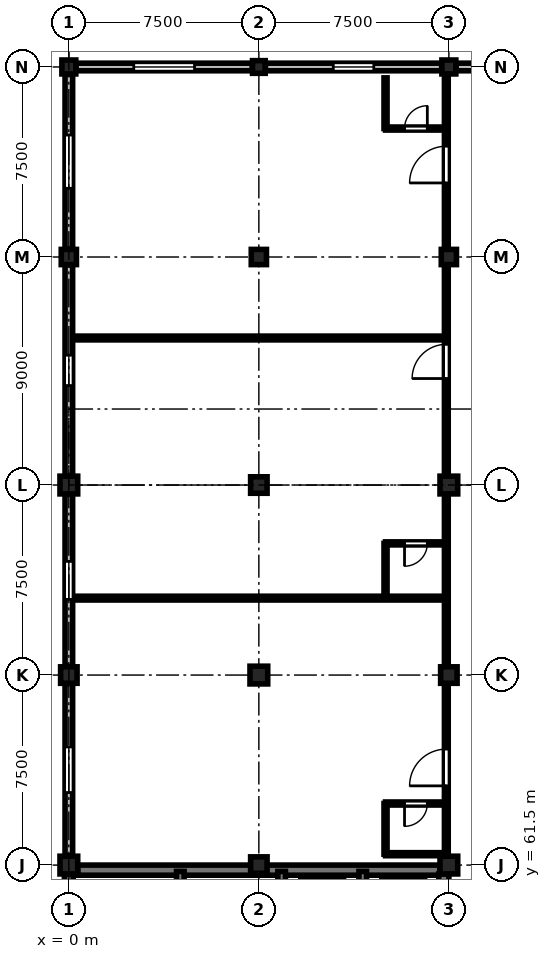
"""IFC4 building model, lengths in metres.
Left out: names, types, materials, properties, quantities, classifications, styles, units other than length and angle.
Written with IfcOpenShell. Run it as: python <this file> out.ifc"""

import sys

from ifc_helpers import new_model, si_unit, direction, frame, frame_2d, origin, origin_2d, place, context, subcontext, project, spatial, rectangle, circle, extrude, element, fill, save


model = new_model("IFC4")
c1 = context("Model", 3, precision=1e-05, world=origin(), true_north=direction((0.0, 1.0)))
c2 = subcontext(c1, "Body", "Model", "MODEL_VIEW")
j1 = project(units=[si_unit("LENGTHUNIT", "METRE"), si_unit("PLANEANGLEUNIT", "RADIAN")], contexts=[c1])
p1 = place(None, origin())
s1 = spatial("IfcSite", under=j1, at=p1, CompositionType="ELEMENT")
p2 = place(p1, origin())
s2 = spatial("IfcBuilding", under=s1, at=p2, CompositionType="ELEMENT")
p3 = place(p2, frame((0.0, 0.0, 17.85)))
s3 = spatial("IfcBuildingStorey", under=s2, at=p3, CompositionType="ELEMENT", Elevation=17.85)
p4 = place(p3, frame((0.0, 61.5, 0.0), z_axis=(0.0, 0.0, 1.0), x_axis=(1.0, 0.0, 0.0)))
e1 = element("IfcColumn", 1, at=p4, inside=s3, PredefinedType="COLUMN", context=c2, shape_type="SweptSolid", body=[
    extrude(rectangle(XDim=0.7, YDim=0.7, at=origin_2d()), origin(), (0.0, 0.0, 1.0), 4.05),
])
p5 = place(p3, frame((0.0, 69.0, 0.0), z_axis=(0.0, 0.0, 1.0), x_axis=(1.0, 0.0, 0.0)))
e2 = element("IfcColumn", 2, at=p5, inside=s3, PredefinedType="COLUMN", context=c2, shape_type="SweptSolid", body=[
    extrude(rectangle(XDim=0.65, YDim=0.65, at=origin_2d()), origin(), (0.0, 0.0, 1.0), 4.05),
])
p6 = place(p3, frame((0.0, 76.5, 0.0), z_axis=(0.0, 0.0, 1.0), x_axis=(1.0, 0.0, 0.0)))
e3 = element("IfcColumn", 3, at=p6, inside=s3, PredefinedType="COLUMN", context=c2, shape_type="SweptSolid", body=[
    extrude(rectangle(XDim=0.7, YDim=0.7, at=origin_2d()), origin(), (0.0, 0.0, 1.0), 4.05),
])
p7 = place(p3, frame((0.0, 85.5, 0.0), z_axis=(0.0, 0.0, 1.0), x_axis=(1.0, 0.0, 0.0)))
e4 = element("IfcColumn", 4, at=p7, inside=s3, PredefinedType="COLUMN", context=c2, shape_type="SweptSolid", body=[
    extrude(rectangle(XDim=0.6, YDim=0.6, at=origin_2d()), origin(), (0.0, 0.0, 1.0), 4.05),
])
p8 = place(p3, frame((0.0, 93.0, 0.0), z_axis=(0.0, 0.0, 1.0), x_axis=(1.0, 0.0, 0.0)))
e5 = element("IfcColumn", 5, at=p8, inside=s3, PredefinedType="COLUMN", context=c2, shape_type="SweptSolid", body=[
    extrude(rectangle(XDim=0.55, YDim=0.55, at=origin_2d()), origin(), (0.0, 0.0, 1.0), 4.05),
])
p9 = place(p3, frame((7.5, 61.5, 0.0), z_axis=(0.0, 0.0, 1.0), x_axis=(1.0, 0.0, 0.0)))
e6 = element("IfcColumn", 6, at=p9, inside=s3, PredefinedType="COLUMN", context=c2, shape_type="SweptSolid", body=[
    extrude(rectangle(XDim=0.65, YDim=0.65, at=origin_2d()), origin(), (0.0, 0.0, 1.0), 4.05),
])
p10 = place(p3, frame((7.5, 69.0, 0.0), z_axis=(0.0, 0.0, 1.0), x_axis=(1.0, 0.0, 0.0)))
e7 = element("IfcColumn", 7, at=p10, inside=s3, PredefinedType="COLUMN", context=c2, shape_type="SweptSolid", body=[
    extrude(rectangle(XDim=0.7, YDim=0.7, at=origin_2d()), origin(), (0.0, 0.0, 1.0), 4.05),
])
p11 = place(p3, frame((7.5, 76.5, 0.0), z_axis=(0.0, 0.0, 1.0), x_axis=(1.0, 0.0, 0.0)))
e8 = element("IfcColumn", 8, at=p11, inside=s3, PredefinedType="COLUMN", context=c2, shape_type="SweptSolid", body=[
    extrude(rectangle(XDim=0.65, YDim=0.65, at=origin_2d()), origin(), (0.0, 0.0, 1.0), 4.05),
])
p12 = place(p3, frame((7.5, 85.5, 0.0), z_axis=(0.0, 0.0, 1.0), x_axis=(1.0, 0.0, 0.0)))
e9 = element("IfcColumn", 9, at=p12, inside=s3, PredefinedType="COLUMN", context=c2, shape_type="SweptSolid", body=[
    extrude(circle(Radius=0.3, at=origin_2d()), origin(), (0.0, 0.0, 1.0), 4.05),
])
p13 = place(p3, frame((7.5, 93.0, 0.0), z_axis=(0.0, 0.0, 1.0), x_axis=(1.0, 0.0, 0.0)))
e10 = element("IfcColumn", 10, at=p13, inside=s3, PredefinedType="COLUMN", context=c2, shape_type="SweptSolid", body=[
    extrude(rectangle(XDim=0.5, YDim=0.5, at=origin_2d()), origin(), (0.0, 0.0, 1.0), 4.05),
])
p14 = place(p3, frame((15.0, 61.5, 0.0), z_axis=(0.0, 0.0, 1.0), x_axis=(1.0, 0.0, 0.0)))
e11 = element("IfcColumn", 11, at=p14, inside=s3, PredefinedType="COLUMN", context=c2, shape_type="SweptSolid", body=[
    extrude(rectangle(XDim=0.7, YDim=0.7, at=origin_2d()), origin(), (0.0, 0.0, 1.0), 4.05),
])
p15 = place(p3, frame((15.0, 69.0, 0.0), z_axis=(0.0, 0.0, 1.0), x_axis=(1.0, 0.0, 0.0)))
e12 = element("IfcColumn", 12, at=p15, inside=s3, PredefinedType="COLUMN", context=c2, shape_type="SweptSolid", body=[
    extrude(rectangle(XDim=0.65, YDim=0.65, at=origin_2d()), origin(), (0.0, 0.0, 1.0), 4.05),
])
p16 = place(p3, frame((15.0, 76.5, 0.0), z_axis=(0.0, 0.0, 1.0), x_axis=(1.0, 0.0, 0.0)))
e13 = element("IfcColumn", 13, at=p16, inside=s3, PredefinedType="COLUMN", context=c2, shape_type="SweptSolid", body=[
    extrude(rectangle(XDim=0.7, YDim=0.7, at=origin_2d()), origin(), (0.0, 0.0, 1.0), 4.05),
])
p17 = place(p3, frame((15.0, 85.5, 0.0), z_axis=(0.0, 0.0, 1.0), x_axis=(1.0, 0.0, 0.0)))
e14 = element("IfcColumn", 14, at=p17, inside=s3, PredefinedType="COLUMN", context=c2, shape_type="SweptSolid", body=[
    extrude(rectangle(XDim=0.6, YDim=0.6, at=origin_2d()), origin(), (0.0, 0.0, 1.0), 4.05),
])
p18 = place(p3, frame((15.0, 93.0, 0.0), z_axis=(0.0, 0.0, 1.0), x_axis=(1.0, 0.0, 0.0)))
e15 = element("IfcColumn", 15, at=p18, inside=s3, PredefinedType="COLUMN", context=c2, shape_type="SweptSolid", body=[
    extrude(rectangle(XDim=0.55, YDim=0.55, at=origin_2d()), origin(), (0.0, 0.0, 1.0), 4.05),
])
p19 = place(p3, frame((0.0, 54.335, 0.0), z_axis=(0.0, 0.0, 1.0), x_axis=(0.0, 1.0, 0.0)))
e16 = element("IfcWall", 16, at=p19, inside=s3, PredefinedType="SHEAR", context=c2, shape_type="SweptSolid", body=[
    extrude(rectangle(XDim=6.805, YDim=0.35, at=frame_2d((3.402, 0.0))), origin(), (0.0, 0.0, 1.0), 3.77),
])
p20 = place(p3, frame((0.0, 61.86, 0.0), z_axis=(0.0, 0.0, 1.0), x_axis=(0.0, 1.0, 0.0)))
e17 = element("IfcWall", 17, at=p20, inside=s3, PredefinedType="STANDARD", context=c2, shape_type="SweptSolid", body=[
    extrude(rectangle(XDim=6.805, YDim=0.3, at=frame_2d((3.402, 0.0))), origin(), (0.0, 0.0, 1.0), 3.17),
])
p21 = place(p20, frame((2.502, 0.0, 0.9)))
e18 = element("IfcOpeningElement", 18, at=p21, cuts=e17, PredefinedType="OPENING", context=c2, shape_type="SweptSolid", body=[
    extrude(rectangle(XDim=1.8, YDim=1.99, at=frame_2d((0.9, 0.995))), frame((0.0, 0.16, 0.0), z_axis=(0.0, -1.0, 0.0), x_axis=(1.0, 0.0, 0.0)), (0.0, 0.0, 1.0), 0.32),
])
p22 = place(p3, frame((0.0, 69.335, 0.0), z_axis=(0.0, 0.0, 1.0), x_axis=(0.0, 1.0, 0.0)))
e19 = element("IfcWall", 19, at=p22, inside=s3, PredefinedType="STANDARD", context=c2, shape_type="SweptSolid", body=[
    extrude(rectangle(XDim=6.805, YDim=0.3, at=frame_2d((3.402, 0.0))), origin(), (0.0, 0.0, 1.0), 3.17),
])
p23 = place(p22, frame((2.653, 0.0, 0.9)))
e20 = element("IfcOpeningElement", 20, at=p23, cuts=e19, PredefinedType="OPENING", context=c2, shape_type="SweptSolid", body=[
    extrude(rectangle(XDim=1.5, YDim=1.99, at=frame_2d((0.75, 0.995))), frame((0.0, 0.16, 0.0), z_axis=(0.0, -1.0, 0.0), x_axis=(1.0, 0.0, 0.0)), (0.0, 0.0, 1.0), 0.32),
])
p24 = place(p3, frame((0.0, 76.86, 0.0), z_axis=(0.0, 0.0, 1.0), x_axis=(0.0, 1.0, 0.0)))
e21 = element("IfcWall", 21, at=p24, inside=s3, PredefinedType="STANDARD", context=c2, shape_type="SweptSolid", body=[
    extrude(rectangle(XDim=8.33, YDim=0.3, at=frame_2d((4.165, 0.0))), origin(), (0.0, 0.0, 1.0), 3.22),
])
p25 = place(p24, frame((3.565, 0.0, 0.9)))
e22 = element("IfcOpeningElement", 22, at=p25, cuts=e21, PredefinedType="OPENING", context=c2, shape_type="SweptSolid", body=[
    extrude(rectangle(XDim=1.2, YDim=2.04, at=frame_2d((0.6, 1.02))), frame((0.0, 0.16, 0.0), z_axis=(0.0, -1.0, 0.0), x_axis=(1.0, 0.0, 0.0)), (0.0, 0.0, 1.0), 0.32),
])
p26 = place(p3, frame((0.285, 93.0, 0.0), z_axis=(0.0, 0.0, 1.0), x_axis=(1.0, 0.0, 0.0)))
e23 = element("IfcWall", 23, at=p26, inside=s3, PredefinedType="STANDARD", context=c2, shape_type="SweptSolid", body=[
    extrude(rectangle(XDim=6.955, YDim=0.3, at=frame_2d((3.478, 0.0))), origin(), (0.0, 0.0, 1.0), 3.17),
])
p27 = place(p26, frame((2.278, 0.0, 0.9)))
e24 = element("IfcOpeningElement", 24, at=p27, cuts=e23, PredefinedType="OPENING", context=c2, shape_type="SweptSolid", body=[
    extrude(rectangle(XDim=2.4, YDim=1.99, at=frame_2d((1.2, 0.995))), frame((0.0, 0.16, 0.0), z_axis=(0.0, -1.0, 0.0), x_axis=(1.0, 0.0, 0.0)), (0.0, 0.0, 1.0), 0.32),
])
p28 = place(p3, frame((0.0, 85.81, 0.0), z_axis=(0.0, 0.0, 1.0), x_axis=(0.0, 1.0, 0.0)))
e25 = element("IfcWall", 25, at=p28, inside=s3, PredefinedType="STANDARD", context=c2, shape_type="SweptSolid", body=[
    extrude(rectangle(XDim=6.905, YDim=0.3, at=frame_2d((3.453, 0.0))), origin(), (0.0, 0.0, 1.0), 3.17),
])
p29 = place(p28, frame((2.403, 0.0, 0.9)))
e26 = element("IfcOpeningElement", 26, at=p29, cuts=e25, PredefinedType="OPENING", context=c2, shape_type="SweptSolid", body=[
    extrude(rectangle(XDim=2.1, YDim=1.99, at=frame_2d((1.05, 0.995))), frame((0.0, 0.16, 0.0), z_axis=(0.0, -1.0, 0.0), x_axis=(1.0, 0.0, 0.0)), (0.0, 0.0, 1.0), 0.32),
])
p30 = place(p3, frame((7.76, 93.0, 0.0), z_axis=(0.0, 0.0, 1.0), x_axis=(1.0, 0.0, 0.0)))
e27 = element("IfcWall", 27, at=p30, inside=s3, PredefinedType="STANDARD", context=c2, shape_type="SweptSolid", body=[
    extrude(rectangle(XDim=6.955, YDim=0.3, at=frame_2d((3.478, 0.0))), origin(), (0.0, 0.0, 1.0), 3.17),
])
p31 = place(p30, frame((2.677, 0.0, 0.9)))
e28 = element("IfcOpeningElement", 28, at=p31, cuts=e27, PredefinedType="OPENING", context=c2, shape_type="SweptSolid", body=[
    extrude(rectangle(XDim=1.6, YDim=1.95, at=frame_2d((0.8, 0.975))), frame((0.0, 0.16, 0.0), z_axis=(0.0, -1.0, 0.0), x_axis=(1.0, 0.0, 0.0)), (0.0, 0.0, 1.0), 0.32),
])
p32 = place(p3, frame((15.285, 93.0, 0.0), z_axis=(0.0, 0.0, 1.0), x_axis=(1.0, 0.0, 0.0)))
e29 = element("IfcWall", 29, at=p32, inside=s3, PredefinedType="STANDARD", context=c2, shape_type="SweptSolid", body=[
    extrude(rectangle(XDim=6.955, YDim=0.3, at=frame_2d((3.478, 0.0))), origin(), (0.0, 0.0, 1.0), 3.17),
])
p33 = place(p32, frame((2.577, 0.0, 0.9)))
e30 = element("IfcOpeningElement", 30, at=p33, cuts=e29, PredefinedType="OPENING", context=c2, shape_type="SweptSolid", body=[
    extrude(rectangle(XDim=1.8, YDim=1.95, at=frame_2d((0.9, 0.975))), frame((0.0, 0.16, 0.0), z_axis=(0.0, -1.0, 0.0), x_axis=(1.0, 0.0, 0.0)), (0.0, 0.0, 1.0), 0.32),
])
p34 = place(p3, frame((0.35, 61.3, 0.0), z_axis=(0.0, 0.0, 1.0), x_axis=(1.0, 0.0, 0.0)))
e31 = element("IfcWall", 31, at=p34, inside=s3, PredefinedType="SHEAR", context=c2, shape_type="SweptSolid", body=[
    extrude(rectangle(XDim=14.3, YDim=0.4, at=frame_2d((7.15, 0.0))), origin(), (0.0, 0.0, 1.0), 3.77),
])
p35 = place(p3, frame((14.8, 58.1, 0.0), z_axis=(0.0, 0.0, 1.0), x_axis=(0.0, 1.0, 0.0)))
e32 = element("IfcWall", 32, at=p35, inside=s3, PredefinedType="SHEAR", context=c2, shape_type="SweptSolid", body=[
    extrude(rectangle(XDim=3.05, YDim=0.4, at=frame_2d((1.525, 0.0))), origin(), (0.0, 0.0, 1.0), 3.77),
])
for number, where, z_axis, x_axis in (
    (33, (4.4, 58.1, 0.0), (0.0, 0.0, 1.0), (0.0, 1.0, 0.0)),
    (34, (8.4, 58.1, 0.0), (0.0, 0.0, 1.0), (0.0, 1.0, 0.0)),
    (35, (11.6, 58.1, 0.0), (0.0, 0.0, 1.0), (0.0, 1.0, 0.0)),
):
    element("IfcWall", number, at=place(p3, frame(where, z_axis=z_axis, x_axis=x_axis)), inside=s3, PredefinedType="SHEAR", context=c2, shape_type="SweptSolid", body=[
        extrude(rectangle(XDim=3.15, YDim=0.3, at=frame_2d((1.575, 0.0))), origin(), (0.0, 0.0, 1.0), 3.77),
    ])
p36 = place(p3, frame((14.9, 61.93, 0.0), z_axis=(0.0, 0.0, 1.0), x_axis=(0.0, 1.0, 0.0)))
e36 = element("IfcWall", 36, at=p36, inside=s3, PredefinedType="PARTITIONING", context=c2, shape_type="SweptSolid", body=[
    extrude(rectangle(XDim=10.107, YDim=0.15, at=frame_2d((5.053, 0.0))), origin(), (0.0, 0.0, 1.0), 3.205),
])
p37 = place(p36, frame((2.697, 0.0, 0.0)))
e37 = element("IfcOpeningElement", 37, at=p37, cuts=e36, PredefinedType="OPENING", context=c2, shape_type="SweptSolid", body=[
    extrude(rectangle(XDim=1.45, YDim=2.3, at=frame_2d((0.725, 1.15))), frame((0.0, 0.085, 0.0), z_axis=(0.0, -1.0, 0.0), x_axis=(1.0, 0.0, 0.0)), (0.0, 0.0, 1.0), 0.17),
])
p38 = place(p3, frame((14.9, 63.93, 0.0), z_axis=(0.0, 0.0, 1.0), x_axis=(-1.0, 0.0, 0.0)))
e38 = element("IfcWall", 38, at=p38, inside=s3, PredefinedType="PARTITIONING", context=c2, shape_type="SweptSolid", body=[
    extrude(rectangle(XDim=2.4, YDim=0.12, at=frame_2d((1.2, 0.0))), origin(), (0.0, 0.0, 1.0), 3.755),
])
p39 = place(p38, frame((0.75, 0.0, 0.0)))
e39 = element("IfcOpeningElement", 39, at=p39, cuts=e38, PredefinedType="OPENING", context=c2, shape_type="SweptSolid", body=[
    extrude(rectangle(XDim=0.9, YDim=2.1, at=frame_2d((0.45, 1.05))), frame((0.0, 0.07, 0.0), z_axis=(0.0, -1.0, 0.0), x_axis=(1.0, 0.0, 0.0)), (0.0, 0.0, 1.0), 0.14),
])
p40 = place(p3, frame((12.5, 61.93, 0.0), z_axis=(0.0, 0.0, 1.0), x_axis=(0.0, 1.0, 0.0)))
e40 = element("IfcWall", 40, at=p40, inside=s3, PredefinedType="PARTITIONING", context=c2, shape_type="SweptSolid", body=[
    extrude(rectangle(XDim=2.0, YDim=0.12, at=frame_2d((1.0, 0.0))), origin(), (0.0, 0.0, 1.0), 3.755),
])
p41 = place(p3, frame((14.9, 72.197, 0.0), z_axis=(0.0, 0.0, 1.0), x_axis=(0.0, 1.0, 0.0)))
e41 = element("IfcWall", 41, at=p41, inside=s3, PredefinedType="PARTITIONING", context=c2, shape_type="SweptSolid", body=[
    extrude(rectangle(XDim=10.106, YDim=0.15, at=frame_2d((5.053, 0.0))), origin(), (0.0, 0.0, 1.0), 3.055),
])
p42 = place(p41, frame((8.507, 0.0, 0.0)))
e42 = element("IfcOpeningElement", 42, at=p42, cuts=e41, PredefinedType="OPENING", context=c2, shape_type="SweptSolid", body=[
    extrude(rectangle(XDim=1.35, YDim=2.25, at=frame_2d((0.675, 1.125))), frame((0.0, 0.085, 0.0), z_axis=(0.0, -1.0, 0.0), x_axis=(1.0, 0.0, 0.0)), (0.0, 0.0, 1.0), 0.17),
])
p43 = place(p3, frame((14.9, 74.197, 0.0), z_axis=(0.0, 0.0, 1.0), x_axis=(-1.0, 0.0, 0.0)))
e43 = element("IfcWall", 43, at=p43, inside=s3, PredefinedType="PARTITIONING", context=c2, shape_type="SweptSolid", body=[
    extrude(rectangle(XDim=2.4, YDim=0.12, at=frame_2d((1.2, 0.0))), origin(), (0.0, 0.0, 1.0), 3.755),
])
p44 = place(p43, frame((0.75, 0.0, 0.0)))
e44 = element("IfcOpeningElement", 44, at=p44, cuts=e43, PredefinedType="OPENING", context=c2, shape_type="SweptSolid", body=[
    extrude(rectangle(XDim=0.9, YDim=2.1, at=frame_2d((0.45, 1.05))), frame((0.0, 0.07, 0.0), z_axis=(0.0, -1.0, 0.0), x_axis=(1.0, 0.0, 0.0)), (0.0, 0.0, 1.0), 0.14),
])
p45 = place(p3, frame((12.5, 72.197, 0.0), z_axis=(0.0, 0.0, 1.0), x_axis=(0.0, 1.0, 0.0)))
e45 = element("IfcWall", 45, at=p45, inside=s3, PredefinedType="PARTITIONING", context=c2, shape_type="SweptSolid", body=[
    extrude(rectangle(XDim=2.0, YDim=0.12, at=frame_2d((1.0, 0.0))), origin(), (0.0, 0.0, 1.0), 3.755),
])
p46 = place(p3, frame((14.9, 82.463, 0.0), z_axis=(0.0, 0.0, 1.0), x_axis=(0.0, 1.0, 0.0)))
e46 = element("IfcWall", 46, at=p46, inside=s3, PredefinedType="PARTITIONING", context=c2, shape_type="SweptSolid", body=[
    extrude(rectangle(XDim=10.107, YDim=0.15, at=frame_2d((5.053, 0.0))), origin(), (0.0, 0.0, 1.0), 3.055),
])
p47 = place(p46, frame((5.96, 0.0, 0.0)))
e47 = element("IfcOpeningElement", 47, at=p47, cuts=e46, PredefinedType="OPENING", context=c2, shape_type="SweptSolid", body=[
    extrude(rectangle(XDim=1.45, YDim=2.3, at=frame_2d((0.725, 1.15))), frame((0.0, 0.085, 0.0), z_axis=(0.0, -1.0, 0.0), x_axis=(1.0, 0.0, 0.0)), (0.0, 0.0, 1.0), 0.17),
])
p48 = place(p3, frame((12.5, 90.57, 0.0), z_axis=(0.0, 0.0, 1.0), x_axis=(1.0, 0.0, 0.0)))
e48 = element("IfcWall", 48, at=p48, inside=s3, PredefinedType="PARTITIONING", context=c2, shape_type="SweptSolid", body=[
    extrude(rectangle(XDim=2.4, YDim=0.12, at=frame_2d((1.2, 0.0))), origin(), (0.0, 0.0, 1.0), 3.755),
])
p49 = place(p48, frame((0.75, 0.0, 0.0)))
e49 = element("IfcOpeningElement", 49, at=p49, cuts=e48, PredefinedType="OPENING", context=c2, shape_type="SweptSolid", body=[
    extrude(rectangle(XDim=0.9, YDim=2.1, at=frame_2d((0.45, 1.05))), frame((0.0, 0.07, 0.0), z_axis=(0.0, -1.0, 0.0), x_axis=(1.0, 0.0, 0.0)), (0.0, 0.0, 1.0), 0.14),
])
p50 = place(p3, frame((12.5, 90.57, 0.0), z_axis=(0.0, 0.0, 1.0), x_axis=(0.0, 1.0, 0.0)))
e50 = element("IfcWall", 50, at=p50, inside=s3, PredefinedType="PARTITIONING", context=c2, shape_type="SweptSolid", body=[
    extrude(rectangle(XDim=2.0, YDim=0.12, at=frame_2d((1.0, 0.0))), origin(), (0.0, 0.0, 1.0), 3.755),
])
for number, where, z_axis, x_axis in (
    (51, (0.35, 72.037, 0.0), (0.0, 0.0, 1.0), (1.0, 0.0, 0.0)),
    (52, (0.35, 82.303, 0.0), (0.0, 0.0, 1.0), (1.0, 0.0, 0.0)),
):
    element("IfcWall", number, at=place(p3, frame(where, z_axis=z_axis, x_axis=x_axis)), inside=s3, PredefinedType="PARTITIONING", context=c2, shape_type="SweptSolid", body=[
        extrude(rectangle(XDim=14.55, YDim=0.15, at=frame_2d((7.275, 0.0))), origin(), (0.0, 0.0, 1.0), 3.755),
    ])
p51 = place(p3, frame((12.5, 61.93, 0.0), z_axis=(0.0, 0.0, 1.0), x_axis=(1.0, 0.0, 0.0)))
e53 = element("IfcWall", 53, at=p51, inside=s3, PredefinedType="PARTITIONING", context=c2, shape_type="SweptSolid", body=[
    extrude(rectangle(XDim=2.4, YDim=0.12, at=frame_2d((1.2, 0.0))), origin(), (0.0, 0.0, 1.0), 3.755),
])
p52 = place(p21, origin())
e54 = element("IfcWindow", 54, at=p52, inside=s3, PartitioningType="SINGLE_PANEL", PredefinedType="WINDOW", context=c2, shape_type="SweptSolid", body=[
    extrude(rectangle(XDim=1.8, YDim=1.99, at=frame_2d((0.9, 0.995))), frame((0.0, 0.03, 0.0), z_axis=(0.0, -1.0, 0.0), x_axis=(1.0, 0.0, 0.0)), (0.0, 0.0, 1.0), 0.06),
])
fill(e18, e54)
p53 = place(p23, origin())
e55 = element("IfcWindow", 55, at=p53, inside=s3, PartitioningType="SINGLE_PANEL", PredefinedType="WINDOW", context=c2, shape_type="SweptSolid", body=[
    extrude(rectangle(XDim=1.5, YDim=1.99, at=frame_2d((0.75, 0.995))), frame((0.0, 0.03, 0.0), z_axis=(0.0, -1.0, 0.0), x_axis=(1.0, 0.0, 0.0)), (0.0, 0.0, 1.0), 0.06),
])
fill(e20, e55)
p54 = place(p25, origin())
e56 = element("IfcWindow", 56, at=p54, inside=s3, PartitioningType="SINGLE_PANEL", PredefinedType="WINDOW", context=c2, shape_type="SweptSolid", body=[
    extrude(rectangle(XDim=1.2, YDim=2.04, at=frame_2d((0.6, 1.02))), frame((0.0, 0.03, 0.0), z_axis=(0.0, -1.0, 0.0), x_axis=(1.0, 0.0, 0.0)), (0.0, 0.0, 1.0), 0.06),
])
fill(e22, e56)
p55 = place(p27, origin())
e57 = element("IfcWindow", 57, at=p55, inside=s3, PartitioningType="SINGLE_PANEL", PredefinedType="WINDOW", context=c2, shape_type="SweptSolid", body=[
    extrude(rectangle(XDim=2.4, YDim=1.99, at=frame_2d((1.2, 0.995))), frame((0.0, 0.03, 0.0), z_axis=(0.0, -1.0, 0.0), x_axis=(1.0, 0.0, 0.0)), (0.0, 0.0, 1.0), 0.06),
])
fill(e24, e57)
p56 = place(p29, origin())
e58 = element("IfcWindow", 58, at=p56, inside=s3, PartitioningType="SINGLE_PANEL", PredefinedType="WINDOW", context=c2, shape_type="SweptSolid", body=[
    extrude(rectangle(XDim=2.1, YDim=1.99, at=frame_2d((1.05, 0.995))), frame((0.0, 0.03, 0.0), z_axis=(0.0, -1.0, 0.0), x_axis=(1.0, 0.0, 0.0)), (0.0, 0.0, 1.0), 0.06),
])
fill(e26, e58)
p57 = place(p31, origin())
e59 = element("IfcWindow", 59, at=p57, inside=s3, PartitioningType="SINGLE_PANEL", PredefinedType="WINDOW", context=c2, shape_type="SweptSolid", body=[
    extrude(rectangle(XDim=1.6, YDim=1.95, at=frame_2d((0.8, 0.975))), frame((0.0, 0.03, 0.0), z_axis=(0.0, -1.0, 0.0), x_axis=(1.0, 0.0, 0.0)), (0.0, 0.0, 1.0), 0.06),
])
fill(e28, e59)
p58 = place(p37, origin())
e60 = element("IfcDoor", 60, at=p58, inside=s3, OperationType="SINGLE_SWING_LEFT", PredefinedType="DOOR", context=c2, shape_type="SweptSolid", body=[
    extrude(rectangle(XDim=1.45, YDim=2.3, at=frame_2d((0.725, 1.15))), frame((0.0, 0.025, 0.0), z_axis=(0.0, -1.0, 0.0), x_axis=(1.0, 0.0, 0.0)), (0.0, 0.0, 1.0), 0.05),
])
fill(e37, e60)
p59 = place(p39, origin())
e61 = element("IfcDoor", 61, at=p59, inside=s3, OperationType="SINGLE_SWING_RIGHT", PredefinedType="DOOR", context=c2, shape_type="SweptSolid", body=[
    extrude(rectangle(XDim=0.9, YDim=2.1, at=frame_2d((0.45, 1.05))), frame((0.0, 0.025, 0.0), z_axis=(0.0, -1.0, 0.0), x_axis=(1.0, 0.0, 0.0)), (0.0, 0.0, 1.0), 0.05),
])
fill(e39, e61)
p60 = place(p42, origin())
e62 = element("IfcDoor", 62, at=p60, inside=s3, OperationType="SINGLE_SWING_LEFT", PredefinedType="DOOR", context=c2, shape_type="SweptSolid", body=[
    extrude(rectangle(XDim=1.35, YDim=2.25, at=frame_2d((0.675, 1.125))), frame((0.0, 0.025, 0.0), z_axis=(0.0, -1.0, 0.0), x_axis=(1.0, 0.0, 0.0)), (0.0, 0.0, 1.0), 0.05),
])
fill(e42, e62)
p61 = place(p44, origin())
e63 = element("IfcDoor", 63, at=p61, inside=s3, OperationType="SINGLE_SWING_RIGHT", PredefinedType="DOOR", context=c2, shape_type="SweptSolid", body=[
    extrude(rectangle(XDim=0.9, YDim=2.1, at=frame_2d((0.45, 1.05))), frame((0.0, 0.025, 0.0), z_axis=(0.0, -1.0, 0.0), x_axis=(1.0, 0.0, 0.0)), (0.0, 0.0, 1.0), 0.05),
])
fill(e44, e63)
p62 = place(p47, origin())
e64 = element("IfcDoor", 64, at=p62, inside=s3, OperationType="SINGLE_SWING_LEFT", PredefinedType="DOOR", context=c2, shape_type="SweptSolid", body=[
    extrude(rectangle(XDim=1.45, YDim=2.3, at=frame_2d((0.725, 1.15))), frame((0.0, 0.025, 0.0), z_axis=(0.0, -1.0, 0.0), x_axis=(1.0, 0.0, 0.0)), (0.0, 0.0, 1.0), 0.05),
])
fill(e47, e64)
p63 = place(p49, origin())
e65 = element("IfcDoor", 65, at=p63, inside=s3, OperationType="SINGLE_SWING_RIGHT", PredefinedType="DOOR", context=c2, shape_type="SweptSolid", body=[
    extrude(rectangle(XDim=0.9, YDim=2.1, at=frame_2d((0.45, 1.05))), frame((0.0, 0.025, 0.0), z_axis=(0.0, -1.0, 0.0), x_axis=(1.0, 0.0, 0.0)), (0.0, 0.0, 1.0), 0.05),
])
fill(e49, e65)
save(model, sys.argv[1])
